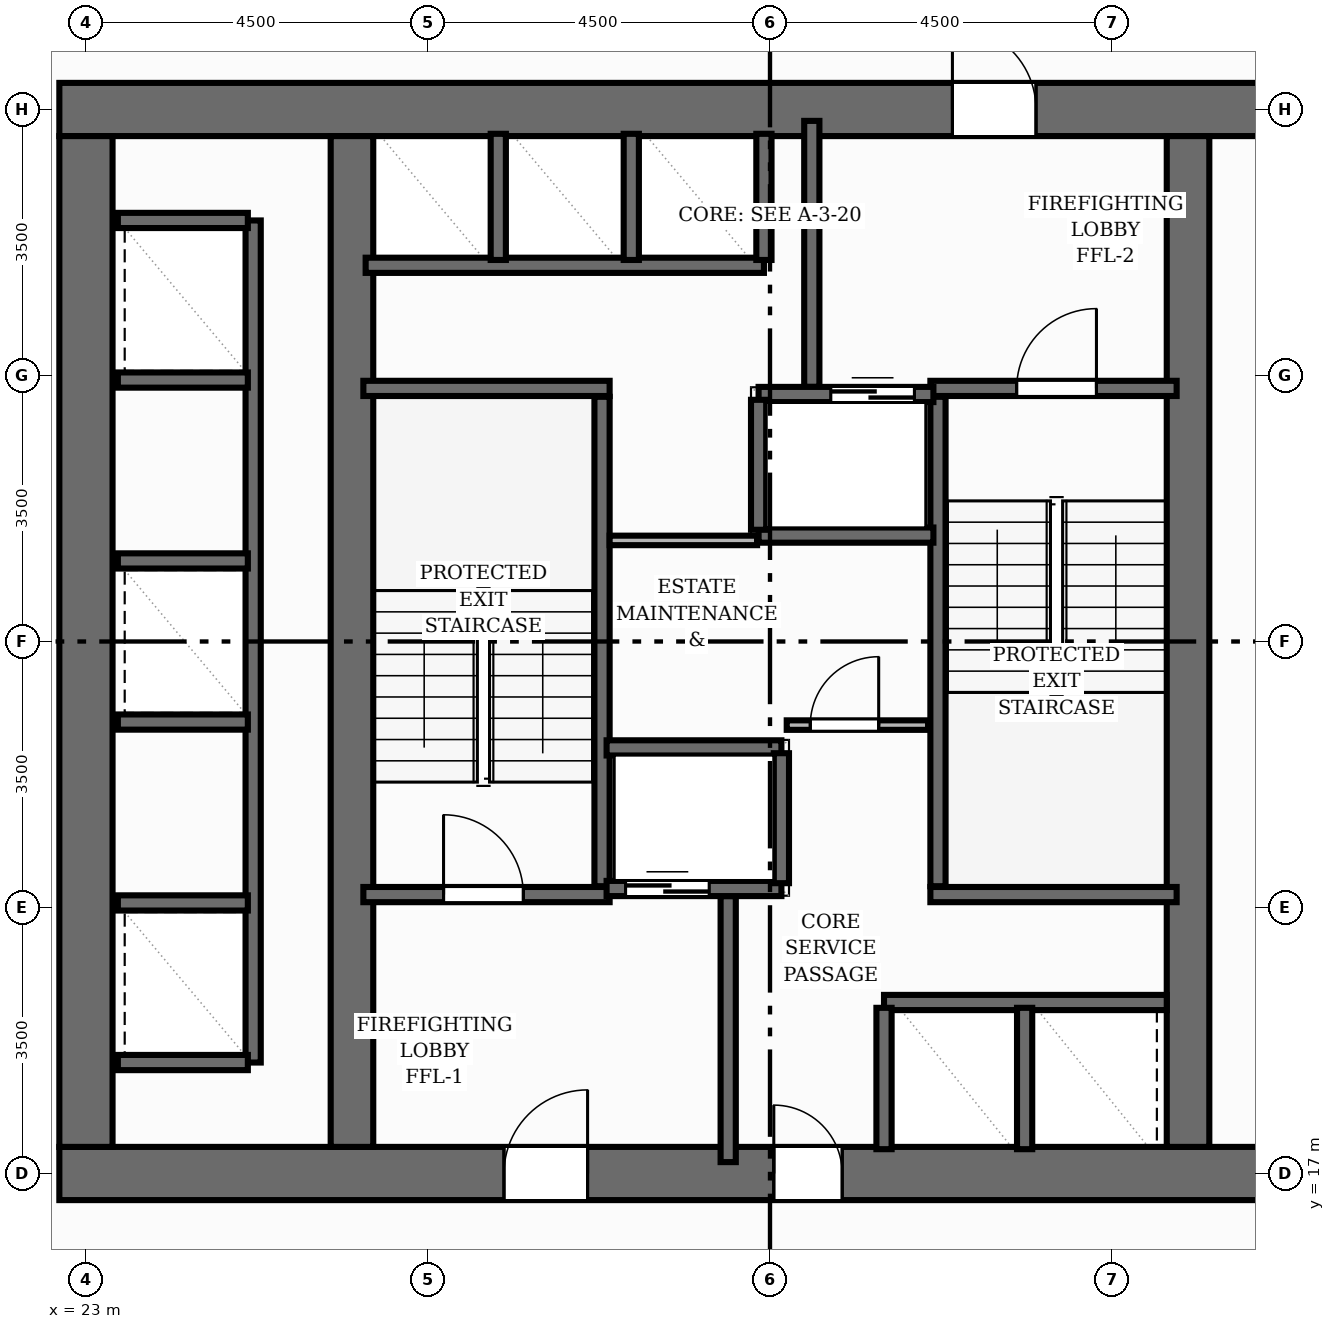
"""IFC4 building model, lengths in metres.
Left out: names, types, materials, properties, quantities, classifications, styles, units other than length and angle.
Written with IfcOpenShell. Run it as: python <this file> out.ifc"""

import sys

from ifc_helpers import new_model, si_unit, direction, frame, frame_2d, origin, place, context, subcontext, project, spatial, rectangle, extrude, element, fill, save


model = new_model("IFC4")
c1 = context("Model", 3, precision=1e-05, world=origin(), true_north=direction((0.0, 1.0)))
c2 = subcontext(c1, "Body", "Model", "MODEL_VIEW")
j1 = project(units=[si_unit("LENGTHUNIT", "METRE"), si_unit("PLANEANGLEUNIT", "RADIAN")], contexts=[c1])
p1 = place(None, origin())
s1 = spatial("IfcSite", under=j1, at=p1, CompositionType="ELEMENT")
p2 = place(p1, origin())
s2 = spatial("IfcBuilding", under=s1, at=p2, CompositionType="ELEMENT")
p3 = place(p2, frame((0.0, 0.0, 74.08)))
s3 = spatial("IfcBuildingStorey", under=s2, at=p3, CompositionType="ELEMENT", Elevation=74.08)
p4 = place(p3, frame((22.65, 17.0, 0.0), z_axis=(0.0, 0.0, 1.0), x_axis=(1.0, 0.0, 0.0)))
e1 = element("IfcWall", 1, at=p4, inside=s3, PredefinedType="SHEAR", context=c2, shape_type="SweptSolid", body=[
    extrude(rectangle(XDim=18.7, YDim=0.7, at=frame_2d((9.35, 0.0))), origin(), (0.0, 0.0, 1.0), 3.2),
])
p5 = place(p4, frame((5.85, 0.0, 0.0)))
e2 = element("IfcOpeningElement", 2, at=p5, cuts=e1, PredefinedType="OPENING", context=c2, shape_type="SweptSolid", body=[
    extrude(rectangle(XDim=1.1, YDim=2.15, at=frame_2d((0.55, 1.075))), frame((0.0, 0.36, 0.0), z_axis=(0.0, -1.0, 0.0), x_axis=(1.0, 0.0, 0.0)), (0.0, 0.0, 1.0), 0.72),
])
p6 = place(p4, frame((9.4, 0.0, 0.0)))
e3 = element("IfcOpeningElement", 3, at=p6, cuts=e1, PredefinedType="OPENING", context=c2, shape_type="SweptSolid", body=[
    extrude(rectangle(XDim=0.9, YDim=2.1, at=frame_2d((0.45, 1.05))), frame((0.0, 0.36, 0.0), z_axis=(0.0, -1.0, 0.0), x_axis=(1.0, 0.0, 0.0)), (0.0, 0.0, 1.0), 0.72),
])
p7 = place(p3, frame((22.65, 31.0, 0.0), z_axis=(0.0, 0.0, 1.0), x_axis=(1.0, 0.0, 0.0)))
e4 = element("IfcWall", 4, at=p7, inside=s3, PredefinedType="SHEAR", context=c2, shape_type="SweptSolid", body=[
    extrude(rectangle(XDim=18.7, YDim=0.7, at=frame_2d((9.35, 0.0))), origin(), (0.0, 0.0, 1.0), 3.2),
])
p8 = place(p7, frame((11.75, 0.0, 0.0)))
e5 = element("IfcOpeningElement", 5, at=p8, cuts=e4, PredefinedType="OPENING", context=c2, shape_type="SweptSolid", body=[
    extrude(rectangle(XDim=1.1, YDim=2.15, at=frame_2d((0.55, 1.075))), frame((0.0, 0.36, 0.0), z_axis=(0.0, -1.0, 0.0), x_axis=(1.0, 0.0, 0.0)), (0.0, 0.0, 1.0), 0.72),
])
p9 = place(p3, frame((23.0, 17.35, 0.0), z_axis=(0.0, 0.0, 1.0), x_axis=(0.0, 1.0, 0.0)))
e6 = element("IfcWall", 6, at=p9, inside=s3, PredefinedType="SHEAR", context=c2, shape_type="SweptSolid", body=[
    extrude(rectangle(XDim=13.3, YDim=0.7, at=frame_2d((6.65, 0.0))), origin(), (0.0, 0.0, 1.0), 3.2),
])
for number, where, z_axis, x_axis in (
    (7, (26.5, 17.35, 0.0), (0.0, 0.0, 1.0), (0.0, 1.0, 0.0)),
    (8, (37.5, 17.35, 0.0), (0.0, 0.0, 1.0), (0.0, 1.0, 0.0)),
):
    element("IfcWall", number, at=place(p3, frame(where, z_axis=z_axis, x_axis=x_axis)), inside=s3, PredefinedType="SHEAR", context=c2, shape_type="SweptSolid", body=[
        extrude(rectangle(XDim=13.3, YDim=0.56, at=frame_2d((6.65, 0.0))), origin(), (0.0, 0.0, 1.0), 3.2),
    ])
p10 = place(p3, frame((29.79, 20.78, 0.0), z_axis=(0.0, 0.0, 1.0), x_axis=(0.0, 1.0, 0.0)))
e9 = element("IfcWall", 9, at=p10, inside=s3, PredefinedType="SHEAR", context=c2, shape_type="SweptSolid", body=[
    extrude(rectangle(XDim=6.44, YDim=0.2, at=frame_2d((3.22, 0.0))), origin(), (0.0, 0.0, 1.0), 3.2),
])
p11 = place(p3, frame((26.65, 27.33, 0.0), z_axis=(0.0, 0.0, 1.0), x_axis=(1.0, 0.0, 0.0)))
e10 = element("IfcWall", 10, at=p11, inside=s3, PredefinedType="SHEAR", context=c2, shape_type="SweptSolid", body=[
    extrude(rectangle(XDim=3.24, YDim=0.2, at=frame_2d((1.62, 0.0))), origin(), (0.0, 0.0, 1.0), 3.2),
])
p12 = place(p3, frame((26.65, 20.67, 0.0), z_axis=(0.0, 0.0, 1.0), x_axis=(1.0, 0.0, 0.0)))
e11 = element("IfcWall", 11, at=p12, inside=s3, PredefinedType="SHEAR", context=c2, shape_type="SweptSolid", body=[
    extrude(rectangle(XDim=3.24, YDim=0.2, at=frame_2d((1.62, 0.0))), origin(), (0.0, 0.0, 1.0), 3.2),
])
p13 = place(p12, frame((1.055, 0.0, 0.0)))
e12 = element("IfcOpeningElement", 12, at=p13, cuts=e11, PredefinedType="OPENING", context=c2, shape_type="SweptSolid", body=[
    extrude(rectangle(XDim=1.05, YDim=2.15, at=frame_2d((0.525, 1.075))), frame((0.0, 0.11, 0.0), z_axis=(0.0, -1.0, 0.0), x_axis=(1.0, 0.0, 0.0)), (0.0, 0.0, 1.0), 0.22),
])
p14 = place(p3, frame((34.21, 20.78, 0.0), z_axis=(0.0, 0.0, 1.0), x_axis=(0.0, 1.0, 0.0)))
e13 = element("IfcWall", 13, at=p14, inside=s3, PredefinedType="SHEAR", context=c2, shape_type="SweptSolid", body=[
    extrude(rectangle(XDim=6.44, YDim=0.2, at=frame_2d((3.22, 0.0))), origin(), (0.0, 0.0, 1.0), 3.2),
])
p15 = place(p3, frame((34.11, 20.67, 0.0), z_axis=(0.0, 0.0, 1.0), x_axis=(1.0, 0.0, 0.0)))
e14 = element("IfcWall", 14, at=p15, inside=s3, PredefinedType="SHEAR", context=c2, shape_type="SweptSolid", body=[
    extrude(rectangle(XDim=3.24, YDim=0.2, at=frame_2d((1.62, 0.0))), origin(), (0.0, 0.0, 1.0), 3.2),
])
p16 = place(p3, frame((34.11, 27.33, 0.0), z_axis=(0.0, 0.0, 1.0), x_axis=(1.0, 0.0, 0.0)))
e15 = element("IfcWall", 15, at=p16, inside=s3, PredefinedType="SHEAR", context=c2, shape_type="SweptSolid", body=[
    extrude(rectangle(XDim=3.24, YDim=0.2, at=frame_2d((1.62, 0.0))), origin(), (0.0, 0.0, 1.0), 3.2),
])
p17 = place(p16, frame((1.135, 0.0, 0.0)))
e16 = element("IfcOpeningElement", 16, at=p17, cuts=e15, PredefinedType="OPENING", context=c2, shape_type="SweptSolid", body=[
    extrude(rectangle(XDim=1.05, YDim=2.15, at=frame_2d((0.525, 1.075))), frame((0.0, 0.11, 0.0), z_axis=(0.0, -1.0, 0.0), x_axis=(1.0, 0.0, 0.0)), (0.0, 0.0, 1.0), 0.22),
])
for number, where, z_axis, x_axis in (
    (17, (31.45, 17.15, 0.0), (0.0, 0.0, 1.0), (0.0, 1.0, 0.0)),
    (18, (32.55, 27.35, 0.0), (0.0, 0.0, 1.0), (0.0, 1.0, 0.0)),
):
    element("IfcWall", number, at=place(p3, frame(where, z_axis=z_axis, x_axis=x_axis)), inside=s3, PredefinedType="SHEAR", context=c2, shape_type="SweptSolid", body=[
        extrude(rectangle(XDim=3.5, YDim=0.2, at=frame_2d((1.75, 0.0))), origin(), (0.0, 0.0, 1.0), 3.2),
    ])
p18 = place(p3, frame((29.85, 20.75, 0.0), z_axis=(0.0, 0.0, 1.0), x_axis=(1.0, 0.0, 0.0)))
e19 = element("IfcWall", 19, at=p18, inside=s3, PredefinedType="SHEAR", context=c2, shape_type="SweptSolid", body=[
    extrude(rectangle(XDim=2.3, YDim=0.2, at=frame_2d((1.15, 0.0))), origin(), (0.0, 0.0, 1.0), 3.2),
])
p19 = place(p18, frame((0.25, 0.0, 0.0)))
e20 = element("IfcOpeningElement", 20, at=p19, cuts=e19, PredefinedType="OPENING", context=c2, shape_type="SweptSolid", body=[
    extrude(rectangle(XDim=1.1, YDim=2.15, at=frame_2d((0.55, 1.075))), frame((0.0, 0.11, 0.0), z_axis=(0.0, -1.0, 0.0), x_axis=(1.0, 0.0, 0.0)), (0.0, 0.0, 1.0), 0.22),
])
p20 = place(p3, frame((29.85, 22.6, 0.0), z_axis=(0.0, 0.0, 1.0), x_axis=(1.0, 0.0, 0.0)))
e21 = element("IfcWall", 21, at=p20, inside=s3, PredefinedType="SHEAR", context=c2, shape_type="SweptSolid", body=[
    extrude(rectangle(XDim=2.3, YDim=0.2, at=frame_2d((1.15, 0.0))), origin(), (0.0, 0.0, 1.0), 3.2),
])
p21 = place(p3, frame((32.15, 20.82, 0.0), z_axis=(0.0, 0.0, 1.0), x_axis=(0.0, 1.0, 0.0)))
e22 = element("IfcWall", 22, at=p21, inside=s3, PredefinedType="SHEAR", context=c2, shape_type="SweptSolid", body=[
    extrude(rectangle(XDim=1.71, YDim=0.2, at=frame_2d((0.855, 0.0))), origin(), (0.0, 0.0, 1.0), 3.2),
])
p22 = place(p3, frame((31.85, 27.25, 0.0), z_axis=(0.0, 0.0, 1.0), x_axis=(1.0, 0.0, 0.0)))
e23 = element("IfcWall", 23, at=p22, inside=s3, PredefinedType="SHEAR", context=c2, shape_type="SweptSolid", body=[
    extrude(rectangle(XDim=2.3, YDim=0.2, at=frame_2d((1.15, 0.0))), origin(), (0.0, 0.0, 1.0), 3.2),
])
p23 = place(p22, frame((0.95, 0.0, 0.0)))
e24 = element("IfcOpeningElement", 24, at=p23, cuts=e23, PredefinedType="OPENING", context=c2, shape_type="SweptSolid", body=[
    extrude(rectangle(XDim=1.1, YDim=2.15, at=frame_2d((0.55, 1.075))), frame((0.0, 0.11, 0.0), z_axis=(0.0, -1.0, 0.0), x_axis=(1.0, 0.0, 0.0)), (0.0, 0.0, 1.0), 0.22),
])
p24 = place(p3, frame((31.85, 25.4, 0.0), z_axis=(0.0, 0.0, 1.0), x_axis=(1.0, 0.0, 0.0)))
e25 = element("IfcWall", 25, at=p24, inside=s3, PredefinedType="SHEAR", context=c2, shape_type="SweptSolid", body=[
    extrude(rectangle(XDim=2.3, YDim=0.2, at=frame_2d((1.15, 0.0))), origin(), (0.0, 0.0, 1.0), 3.2),
])
p25 = place(p3, frame((31.85, 25.47, 0.0), z_axis=(0.0, 0.0, 1.0), x_axis=(0.0, 1.0, 0.0)))
e26 = element("IfcWall", 26, at=p25, inside=s3, PredefinedType="SHEAR", context=c2, shape_type="SweptSolid", body=[
    extrude(rectangle(XDim=1.71, YDim=0.2, at=frame_2d((0.855, 0.0))), origin(), (0.0, 0.0, 1.0), 3.2),
])
p26 = place(p3, frame((25.2, 18.46, 0.0), z_axis=(0.0, 0.0, 1.0), x_axis=(0.0, 1.0, 0.0)))
e27 = element("IfcWall", 27, at=p26, inside=s3, PredefinedType="SHEAR", context=c2, shape_type="SweptSolid", body=[
    extrude(rectangle(XDim=11.08, YDim=0.2, at=frame_2d((5.54, 0.0))), origin(), (0.0, 0.0, 1.0), 3.2),
])
for number, where, z_axis, x_axis in (
    (28, (23.42, 18.46, 0.0), (0.0, 0.0, 1.0), (1.0, 0.0, 0.0)),
    (29, (23.42, 29.54, 0.0), (0.0, 0.0, 1.0), (1.0, 0.0, 0.0)),
    (30, (23.42, 20.56, 0.0), (0.0, 0.0, 1.0), (1.0, 0.0, 0.0)),
    (31, (23.42, 22.94, 0.0), (0.0, 0.0, 1.0), (1.0, 0.0, 0.0)),
    (32, (23.42, 25.06, 0.0), (0.0, 0.0, 1.0), (1.0, 0.0, 0.0)),
    (33, (23.42, 27.44, 0.0), (0.0, 0.0, 1.0), (1.0, 0.0, 0.0)),
):
    element("IfcWall", number, at=place(p3, frame(where, z_axis=z_axis, x_axis=x_axis)), inside=s3, PredefinedType="SHEAR", context=c2, shape_type="SweptSolid", body=[
        extrude(rectangle(XDim=1.71, YDim=0.2, at=frame_2d((0.855, 0.0))), origin(), (0.0, 0.0, 1.0), 3.2),
    ])
p27 = place(p3, frame((26.68, 28.95, 0.0), z_axis=(0.0, 0.0, 1.0), x_axis=(1.0, 0.0, 0.0)))
e34 = element("IfcWall", 34, at=p27, inside=s3, PredefinedType="SHEAR", context=c2, shape_type="SweptSolid", body=[
    extrude(rectangle(XDim=5.24, YDim=0.2, at=frame_2d((2.62, 0.0))), origin(), (0.0, 0.0, 1.0), 3.2),
])
for number, where, z_axis, x_axis in (
    (35, (31.92, 29.02, 0.0), (0.0, 0.0, 1.0), (0.0, 1.0, 0.0)),
    (36, (28.425, 29.02, 0.0), (0.0, 0.0, 1.0), (0.0, 1.0, 0.0)),
    (37, (30.175, 29.02, 0.0), (0.0, 0.0, 1.0), (0.0, 1.0, 0.0)),
):
    element("IfcWall", number, at=place(p3, frame(where, z_axis=z_axis, x_axis=x_axis)), inside=s3, PredefinedType="SHEAR", context=c2, shape_type="SweptSolid", body=[
        extrude(rectangle(XDim=1.66, YDim=0.2, at=frame_2d((0.83, 0.0))), origin(), (0.0, 0.0, 1.0), 3.2),
    ])
p28 = place(p3, frame((33.5, 19.25, 0.0), z_axis=(0.0, 0.0, 1.0), x_axis=(1.0, 0.0, 0.0)))
e38 = element("IfcWall", 38, at=p28, inside=s3, PredefinedType="SHEAR", context=c2, shape_type="SweptSolid", body=[
    extrude(rectangle(XDim=3.72, YDim=0.2, at=frame_2d((1.86, 0.0))), origin(), (0.0, 0.0, 1.0), 3.2),
])
for number, where, z_axis, x_axis in (
    (39, (33.5, 17.32, 0.0), (0.0, 0.0, 1.0), (0.0, 1.0, 0.0)),
    (40, (35.35, 17.32, 0.0), (0.0, 0.0, 1.0), (0.0, 1.0, 0.0)),
):
    element("IfcWall", number, at=place(p3, frame(where, z_axis=z_axis, x_axis=x_axis)), inside=s3, PredefinedType="SHEAR", context=c2, shape_type="SweptSolid", body=[
        extrude(rectangle(XDim=1.86, YDim=0.2, at=frame_2d((0.93, 0.0))), origin(), (0.0, 0.0, 1.0), 3.2),
    ])
p29 = place(p3, frame((32.22, 22.9, 0.0), z_axis=(0.0, 0.0, 1.0), x_axis=(1.0, 0.0, 0.0)))
e41 = element("IfcWall", 41, at=p29, inside=s3, PredefinedType="PARTITIONING", context=c2, shape_type="SweptSolid", body=[
    extrude(rectangle(XDim=1.86, YDim=0.125, at=frame_2d((0.93, 0.0))), origin(), (0.0, 0.0, 1.0), 2.955),
])
p30 = place(p29, frame((0.31, 0.0, 0.0)))
e42 = element("IfcOpeningElement", 42, at=p30, cuts=e41, PredefinedType="OPENING", context=c2, shape_type="SweptSolid", body=[
    extrude(rectangle(XDim=0.9, YDim=2.1, at=frame_2d((0.45, 1.05))), frame((0.0, 0.073, 0.0), z_axis=(0.0, -1.0, 0.0), x_axis=(1.0, 0.0, 0.0)), (0.0, 0.0, 1.0), 0.145),
])
p31 = place(p3, frame((29.89, 25.33, 0.0), z_axis=(0.0, 0.0, 1.0), x_axis=(1.0, 0.0, 0.0)))
e43 = element("IfcWall", 43, at=p31, inside=s3, PredefinedType="PARTITIONING", context=c2, shape_type="SweptSolid", body=[
    extrude(rectangle(XDim=1.94, YDim=0.125, at=frame_2d((0.97, 0.0))), origin(), (0.0, 0.0, 1.0), 2.955),
])
p32 = place(p13, origin())
e44 = element("IfcDoor", 44, at=p32, inside=s3, OperationType="SINGLE_SWING_LEFT", PredefinedType="DOOR", context=c2, shape_type="SweptSolid", body=[
    extrude(rectangle(XDim=1.05, YDim=2.15, at=frame_2d((0.525, 1.075))), frame((0.0, 0.025, 0.0), z_axis=(0.0, -1.0, 0.0), x_axis=(1.0, 0.0, 0.0)), (0.0, 0.0, 1.0), 0.05),
])
fill(e12, e44)
p33 = place(p17, origin())
e45 = element("IfcDoor", 45, at=p33, inside=s3, OperationType="SINGLE_SWING_RIGHT", PredefinedType="DOOR", context=c2, shape_type="SweptSolid", body=[
    extrude(rectangle(XDim=1.05, YDim=2.15, at=frame_2d((0.525, 1.075))), frame((0.0, 0.025, 0.0), z_axis=(0.0, -1.0, 0.0), x_axis=(1.0, 0.0, 0.0)), (0.0, 0.0, 1.0), 0.05),
])
fill(e16, e45)
p34 = place(p5, origin())
e46 = element("IfcDoor", 46, at=p34, inside=s3, OperationType="SINGLE_SWING_RIGHT", PredefinedType="DOOR", context=c2, shape_type="SweptSolid", body=[
    extrude(rectangle(XDim=1.1, YDim=2.15, at=frame_2d((0.55, 1.075))), frame((0.0, 0.025, 0.0), z_axis=(0.0, -1.0, 0.0), x_axis=(1.0, 0.0, 0.0)), (0.0, 0.0, 1.0), 0.05),
])
fill(e2, e46)
p35 = place(p8, origin())
e47 = element("IfcDoor", 47, at=p35, inside=s3, OperationType="SINGLE_SWING_LEFT", PredefinedType="DOOR", context=c2, shape_type="SweptSolid", body=[
    extrude(rectangle(XDim=1.1, YDim=2.15, at=frame_2d((0.55, 1.075))), frame((0.0, 0.025, 0.0), z_axis=(0.0, -1.0, 0.0), x_axis=(1.0, 0.0, 0.0)), (0.0, 0.0, 1.0), 0.05),
])
fill(e5, e47)
p36 = place(p19, origin())
e48 = element("IfcDoor", 48, at=p36, inside=s3, OperationType="DOUBLE_DOOR_SLIDING", PredefinedType="DOOR", context=c2, shape_type="SweptSolid", body=[
    extrude(rectangle(XDim=1.1, YDim=2.15, at=frame_2d((0.55, 1.075))), frame((0.0, 0.025, 0.0), z_axis=(0.0, -1.0, 0.0), x_axis=(1.0, 0.0, 0.0)), (0.0, 0.0, 1.0), 0.05),
])
fill(e20, e48)
p37 = place(p23, origin())
e49 = element("IfcDoor", 49, at=p37, inside=s3, OperationType="DOUBLE_DOOR_SLIDING", PredefinedType="DOOR", context=c2, shape_type="SweptSolid", body=[
    extrude(rectangle(XDim=1.1, YDim=2.15, at=frame_2d((0.55, 1.075))), frame((0.0, 0.025, 0.0), z_axis=(0.0, -1.0, 0.0), x_axis=(1.0, 0.0, 0.0)), (0.0, 0.0, 1.0), 0.05),
])
fill(e24, e49)
p38 = place(p6, origin())
e50 = element("IfcDoor", 50, at=p38, inside=s3, OperationType="SINGLE_SWING_LEFT", PredefinedType="DOOR", context=c2, shape_type="SweptSolid", body=[
    extrude(rectangle(XDim=0.9, YDim=2.1, at=frame_2d((0.45, 1.05))), frame((0.0, 0.025, 0.0), z_axis=(0.0, -1.0, 0.0), x_axis=(1.0, 0.0, 0.0)), (0.0, 0.0, 1.0), 0.05),
])
fill(e3, e50)
p39 = place(p30, origin())
e51 = element("IfcDoor", 51, at=p39, inside=s3, OperationType="SINGLE_SWING_RIGHT", PredefinedType="DOOR", context=c2, shape_type="SweptSolid", body=[
    extrude(rectangle(XDim=0.9, YDim=2.1, at=frame_2d((0.45, 1.05))), frame((0.0, 0.025, 0.0), z_axis=(0.0, -1.0, 0.0), x_axis=(1.0, 0.0, 0.0)), (0.0, 0.0, 1.0), 0.05),
])
fill(e42, e51)
save(model, sys.argv[1])
